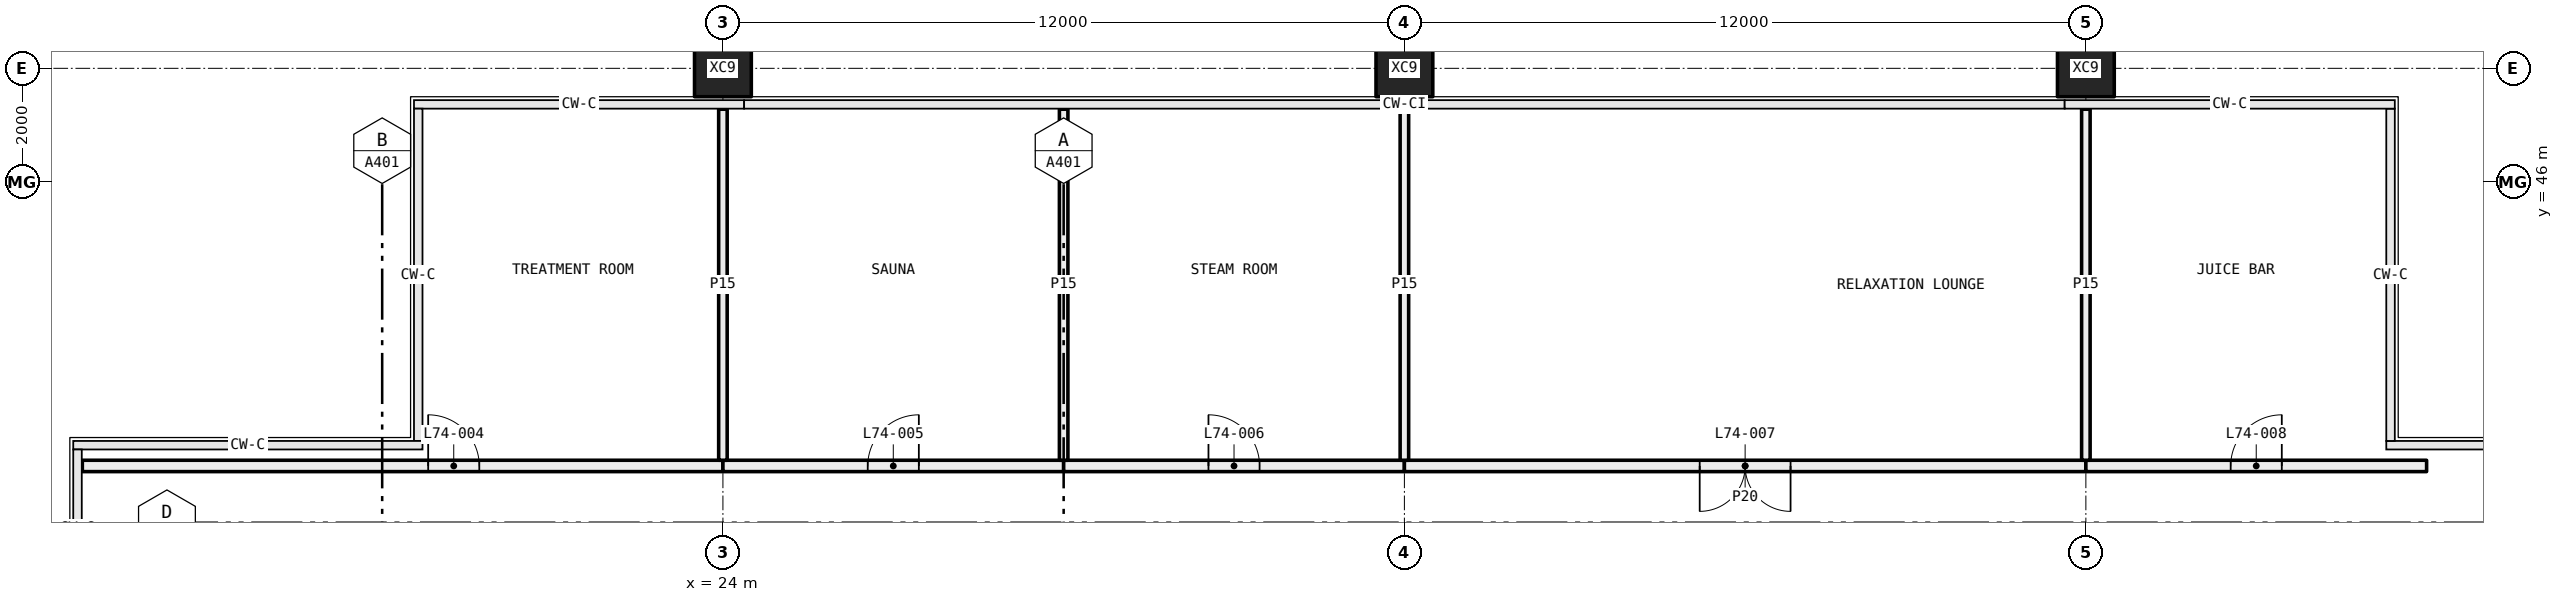
"""IFC4 building model, lengths in metres.
Left out: names, types, materials, properties, quantities, classifications, styles, units other than length and angle.
Written with IfcOpenShell. Run it as: python <this file> out.ifc"""

import sys

from ifc_helpers import new_model, si_unit, direction, frame, frame_2d, origin, origin_2d, place, context, subcontext, project, spatial, rectangle, hollow_rectangle, extrude, element, fill, save


model = new_model("IFC4")
c1 = context("Model", 3, precision=1e-05, world=origin(), true_north=direction((0.0, 1.0)))
c2 = subcontext(c1, "Body", "Model", "MODEL_VIEW")
j1 = project(units=[si_unit("LENGTHUNIT", "METRE"), si_unit("PLANEANGLEUNIT", "RADIAN")], contexts=[c1])
p1 = place(None, origin())
s1 = spatial("IfcSite", under=j1, at=p1, CompositionType="ELEMENT")
p2 = place(p1, origin())
s2 = spatial("IfcBuilding", under=s1, at=p2, CompositionType="ELEMENT")
p3 = place(p2, frame((0.0, 0.0, 273.15)))
s3 = spatial("IfcBuildingStorey", under=s2, at=p3, CompositionType="ELEMENT", Elevation=273.15)
for number, where, z_axis, x_axis in (
    (1, (24.0, 48.0, -0.4), (0.0, 0.0, 1.0), (1.0, 0.0, 0.0)),
    (2, (36.0, 48.0, -0.4), (0.0, 0.0, 1.0), (1.0, 0.0, 0.0)),
    (3, (48.0, 48.0, -0.4), (0.0, 0.0, 1.0), (1.0, 0.0, 0.0)),
):
    element("IfcColumn", number, at=place(p3, frame(where, z_axis=z_axis, x_axis=x_axis)), inside=s3, PredefinedType="COLUMN", context=c2, shape_type="SweptSolid", body=[
        extrude(hollow_rectangle(XDim=1.0, YDim=1.0, WallThickness=0.036, at=origin_2d()), origin(), (0.0, 0.0, 1.0), 4.8),
    ])
p4 = place(p3, frame((24.0, 41.0, 0.0), z_axis=(0.0, 0.0, 1.0), x_axis=(-1.0, 0.0, 0.0)))
e4 = element("IfcWall", 4, at=p4, inside=s3, PredefinedType="PARTITIONING", context=c2, shape_type="SweptSolid", body=[
    extrude(rectangle(XDim=11.28, YDim=0.2, at=frame_2d((5.64, 0.0))), origin(), (0.0, 0.0, 1.0), 4.4),
])
p5 = place(p4, frame((4.29, 0.0, 0.0)))
e5 = element("IfcOpeningElement", 5, at=p5, cuts=e4, PredefinedType="OPENING", context=c2, shape_type="SweptSolid", body=[
    extrude(rectangle(XDim=0.9, YDim=2.1, at=frame_2d((0.45, 1.05))), frame((0.0, 0.11, 0.0), z_axis=(0.0, -1.0, 0.0), x_axis=(1.0, 0.0, 0.0)), (0.0, 0.0, 1.0), 0.22),
])
p6 = place(p3, frame((30.0, 41.0, 0.0), z_axis=(0.0, 0.0, 1.0), x_axis=(-1.0, 0.0, 0.0)))
e6 = element("IfcWall", 6, at=p6, inside=s3, PredefinedType="PARTITIONING", context=c2, shape_type="SweptSolid", body=[
    extrude(rectangle(XDim=6.0, YDim=0.2, at=frame_2d((3.0, 0.0))), origin(), (0.0, 0.0, 1.0), 4.4),
])
p7 = place(p6, frame((2.55, 0.0, 0.0)))
e7 = element("IfcOpeningElement", 7, at=p7, cuts=e6, PredefinedType="OPENING", context=c2, shape_type="SweptSolid", body=[
    extrude(rectangle(XDim=0.9, YDim=2.1, at=frame_2d((0.45, 1.05))), frame((0.0, 0.11, 0.0), z_axis=(0.0, -1.0, 0.0), x_axis=(1.0, 0.0, 0.0)), (0.0, 0.0, 1.0), 0.22),
])
p8 = place(p3, frame((36.0, 41.0, 0.0), z_axis=(0.0, 0.0, 1.0), x_axis=(-1.0, 0.0, 0.0)))
e8 = element("IfcWall", 8, at=p8, inside=s3, PredefinedType="PARTITIONING", context=c2, shape_type="SweptSolid", body=[
    extrude(rectangle(XDim=6.0, YDim=0.2, at=frame_2d((3.0, 0.0))), origin(), (0.0, 0.0, 1.0), 3.8),
])
p9 = place(p8, frame((2.55, 0.0, 0.0)))
e9 = element("IfcOpeningElement", 9, at=p9, cuts=e8, PredefinedType="OPENING", context=c2, shape_type="SweptSolid", body=[
    extrude(rectangle(XDim=0.9, YDim=2.1, at=frame_2d((0.45, 1.05))), frame((0.0, 0.11, 0.0), z_axis=(0.0, -1.0, 0.0), x_axis=(1.0, 0.0, 0.0)), (0.0, 0.0, 1.0), 0.22),
])
p10 = place(p3, frame((48.0, 41.0, 0.0), z_axis=(0.0, 0.0, 1.0), x_axis=(-1.0, 0.0, 0.0)))
e10 = element("IfcWall", 10, at=p10, inside=s3, PredefinedType="PARTITIONING", context=c2, shape_type="SweptSolid", body=[
    extrude(rectangle(XDim=12.0, YDim=0.2, at=frame_2d((6.0, 0.0))), origin(), (0.0, 0.0, 1.0), 3.8),
])
p11 = place(p10, frame((5.2, 0.0, 0.0)))
e11 = element("IfcOpeningElement", 11, at=p11, cuts=e10, PredefinedType="OPENING", context=c2, shape_type="SweptSolid", body=[
    extrude(rectangle(XDim=1.6, YDim=2.1, at=frame_2d((0.8, 1.05))), frame((0.0, 0.11, 0.0), z_axis=(0.0, -1.0, 0.0), x_axis=(1.0, 0.0, 0.0)), (0.0, 0.0, 1.0), 0.22),
])
p12 = place(p3, frame((54.0, 41.0, 0.0), z_axis=(0.0, 0.0, 1.0), x_axis=(-1.0, 0.0, 0.0)))
e12 = element("IfcWall", 12, at=p12, inside=s3, PredefinedType="PARTITIONING", context=c2, shape_type="SweptSolid", body=[
    extrude(rectangle(XDim=6.0, YDim=0.2, at=frame_2d((3.0, 0.0))), origin(), (0.0, 0.0, 1.0), 4.4),
])
p13 = place(p12, frame((2.55, 0.0, 0.0)))
e13 = element("IfcOpeningElement", 13, at=p13, cuts=e12, PredefinedType="OPENING", context=c2, shape_type="SweptSolid", body=[
    extrude(rectangle(XDim=0.9, YDim=2.1, at=frame_2d((0.45, 1.05))), frame((0.0, 0.11, 0.0), z_axis=(0.0, -1.0, 0.0), x_axis=(1.0, 0.0, 0.0)), (0.0, 0.0, 1.0), 0.22),
])
for number, where, z_axis, x_axis in (
    (14, (24.0, 41.1, 0.0), (0.0, 0.0, 1.0), (0.0, 1.0, 0.0)),
    (15, (30.0, 41.1, 0.0), (0.0, 0.0, 1.0), (0.0, 1.0, 0.0)),
):
    element("IfcWall", number, at=place(p3, frame(where, z_axis=z_axis, x_axis=x_axis)), inside=s3, PredefinedType="PARTITIONING", context=c2, shape_type="SweptSolid", body=[
        extrude(rectangle(XDim=6.18, YDim=0.15, at=frame_2d((3.09, 0.0))), origin(), (0.0, 0.0, 1.0), 4.4),
    ])
p14 = place(p3, frame((36.0, 41.1, 0.0), z_axis=(0.0, 0.0, 1.0), x_axis=(0.0, 1.0, 0.0)))
e16 = element("IfcWall", 16, at=p14, inside=s3, PredefinedType="PARTITIONING", context=c2, shape_type="SweptSolid", body=[
    extrude(rectangle(XDim=6.18, YDim=0.15, at=frame_2d((3.09, 0.0))), origin(), (0.0, 0.0, 1.0), 3.8),
])
p15 = place(p3, frame((48.0, 41.1, 0.0), z_axis=(0.0, 0.0, 1.0), x_axis=(0.0, 1.0, 0.0)))
e17 = element("IfcWall", 17, at=p15, inside=s3, PredefinedType="PARTITIONING", context=c2, shape_type="SweptSolid", body=[
    extrude(rectangle(XDim=6.18, YDim=0.15, at=frame_2d((3.09, 0.0))), origin(), (0.0, 0.0, 1.0), 4.4),
])
p16 = place(p5, frame((0.9, 0.0, 0.0), x_axis=(-1.0, 0.0, 0.0)))
e18 = element("IfcDoor", 18, at=p16, inside=s3, OperationType="SINGLE_SWING_RIGHT", PredefinedType="DOOR", context=c2, shape_type="SweptSolid", body=[
    extrude(rectangle(XDim=0.9, YDim=2.1, at=frame_2d((0.45, 1.05))), frame((0.0, 0.025, 0.0), z_axis=(0.0, -1.0, 0.0), x_axis=(1.0, 0.0, 0.0)), (0.0, 0.0, 1.0), 0.05),
])
fill(e5, e18)
p17 = place(p7, frame((0.9, 0.0, 0.0), x_axis=(-1.0, 0.0, 0.0)))
e19 = element("IfcDoor", 19, at=p17, inside=s3, OperationType="SINGLE_SWING_LEFT", PredefinedType="DOOR", context=c2, shape_type="SweptSolid", body=[
    extrude(rectangle(XDim=0.9, YDim=2.1, at=frame_2d((0.45, 1.05))), frame((0.0, 0.025, 0.0), z_axis=(0.0, -1.0, 0.0), x_axis=(1.0, 0.0, 0.0)), (0.0, 0.0, 1.0), 0.05),
])
fill(e7, e19)
p18 = place(p9, frame((0.9, 0.0, 0.0), x_axis=(-1.0, 0.0, 0.0)))
e20 = element("IfcDoor", 20, at=p18, inside=s3, OperationType="SINGLE_SWING_RIGHT", PredefinedType="DOOR", context=c2, shape_type="SweptSolid", body=[
    extrude(rectangle(XDim=0.9, YDim=2.1, at=frame_2d((0.45, 1.05))), frame((0.0, 0.025, 0.0), z_axis=(0.0, -1.0, 0.0), x_axis=(1.0, 0.0, 0.0)), (0.0, 0.0, 1.0), 0.05),
])
fill(e9, e20)
p19 = place(p11, origin())
e21 = element("IfcDoor", 21, at=p19, inside=s3, OperationType="DOUBLE_DOOR_SINGLE_SWING", PredefinedType="DOOR", context=c2, shape_type="SweptSolid", body=[
    extrude(rectangle(XDim=1.6, YDim=2.1, at=frame_2d((0.8, 1.05))), frame((0.0, 0.025, 0.0), z_axis=(0.0, -1.0, 0.0), x_axis=(1.0, 0.0, 0.0)), (0.0, 0.0, 1.0), 0.05),
])
fill(e11, e21)
p20 = place(p13, frame((0.9, 0.0, 0.0), x_axis=(-1.0, 0.0, 0.0)))
e22 = element("IfcDoor", 22, at=p20, inside=s3, OperationType="SINGLE_SWING_LEFT", PredefinedType="DOOR", context=c2, shape_type="SweptSolid", body=[
    extrude(rectangle(XDim=0.9, YDim=2.1, at=frame_2d((0.45, 1.05))), frame((0.0, 0.025, 0.0), z_axis=(0.0, -1.0, 0.0), x_axis=(1.0, 0.0, 0.0)), (0.0, 0.0, 1.0), 0.05),
])
fill(e13, e22)
save(model, sys.argv[1])
